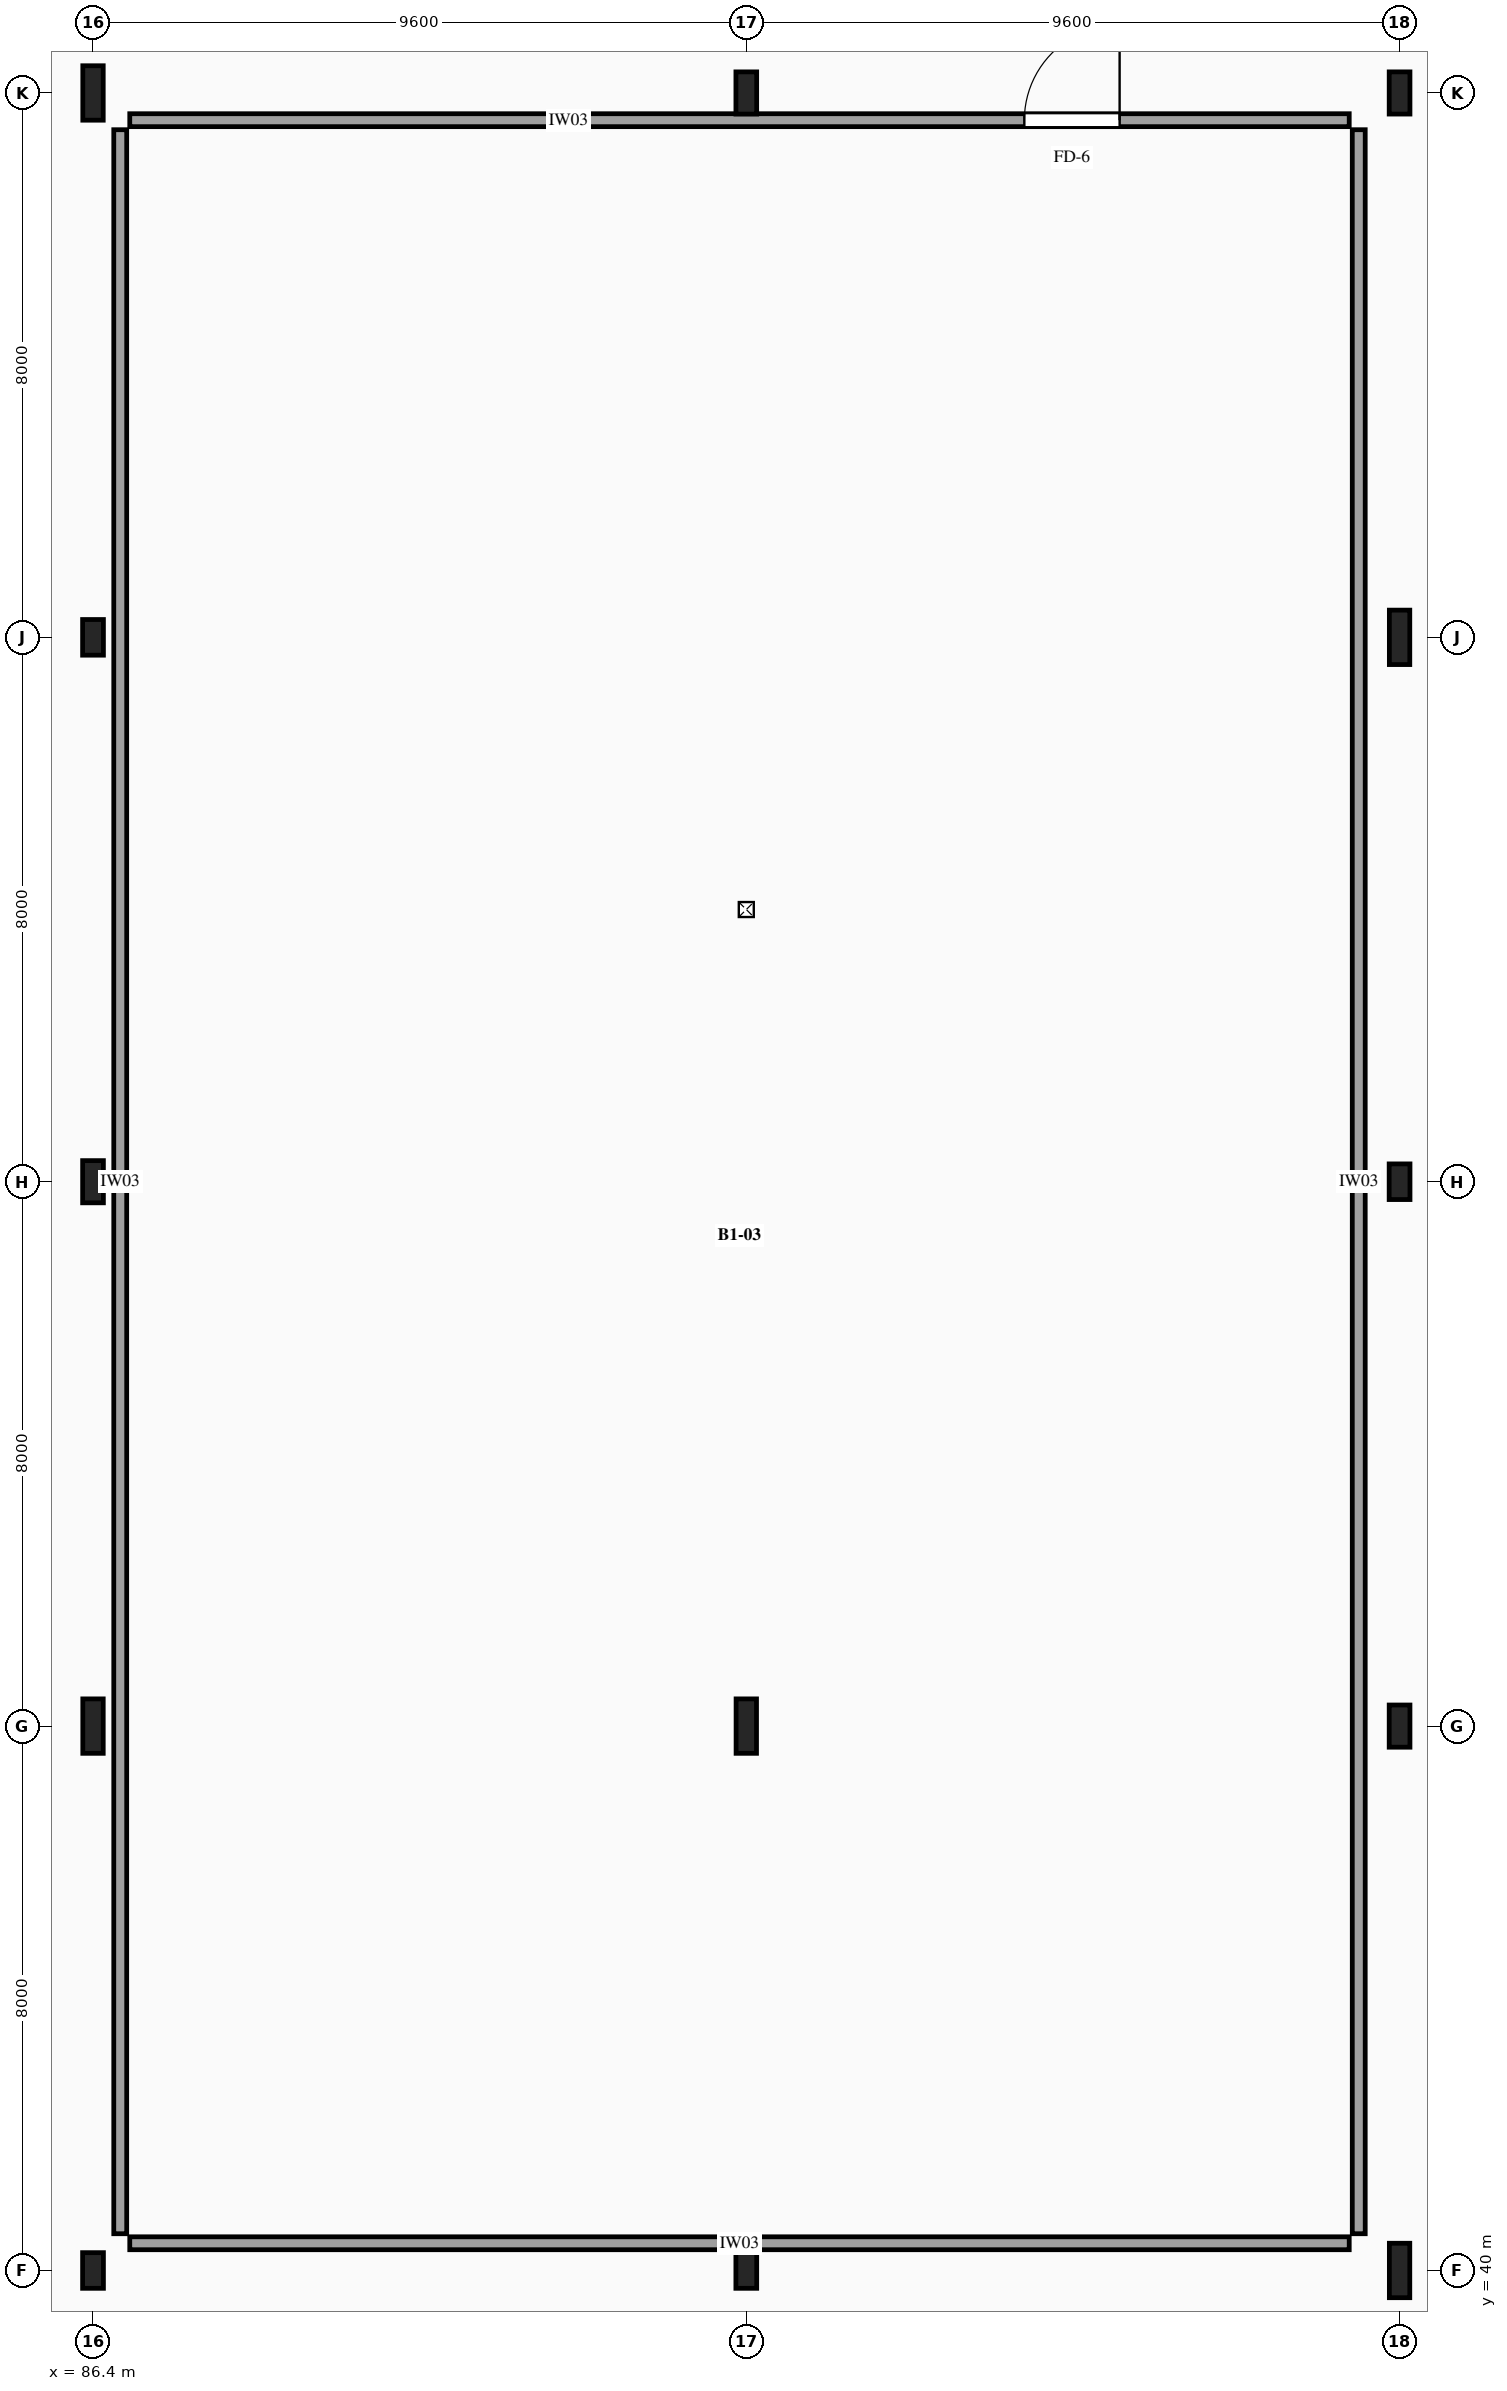
"""IFC4 building model, lengths in metres.
Left out: names, types, materials, properties, quantities, classifications, styles, units other than length and angle.
Written with IfcOpenShell. Run it as: python <this file> out.ifc"""

import sys

from ifc_helpers import new_model, si_unit, direction, frame, frame_2d, origin, origin_2d, place, context, subcontext, project, spatial, rectangle, i_section, extrude, element, fill, save


model = new_model("IFC4")
c1 = context("Model", 3, precision=1e-05, world=origin(), true_north=direction((0.0, 1.0)))
c2 = subcontext(c1, "Body", "Model", "MODEL_VIEW")
j1 = project(units=[si_unit("LENGTHUNIT", "METRE"), si_unit("PLANEANGLEUNIT", "RADIAN")], contexts=[c1])
p1 = place(None, origin())
s1 = spatial("IfcSite", under=j1, at=p1, CompositionType="ELEMENT")
p2 = place(p1, origin())
s2 = spatial("IfcBuilding", under=s1, at=p2, CompositionType="ELEMENT")
p3 = place(p2, frame((0.0, 0.0, -4.5)))
s3 = spatial("IfcBuildingStorey", under=s2, at=p3, CompositionType="ELEMENT", Elevation=-4.5)
p4 = place(p3, frame((86.4, 40.0, 0.0), z_axis=(0.0, 0.0, 1.0), x_axis=(1.0, 0.0, 0.0)))
e1 = element("IfcColumn", 1, at=p4, inside=s3, PredefinedType="COLUMN", context=c2, shape_type="SweptSolid", body=[
    extrude(i_section(OverallWidth=0.306, OverallDepth=0.524, WebThickness=0.021, FlangeThickness=0.04, FilletRadius=0.027, at=origin_2d()), origin(), (0.0, 0.0, 1.0), 4.22),
])
p5 = place(p3, frame((86.4, 48.0, 0.0), z_axis=(0.0, 0.0, 1.0), x_axis=(1.0, 0.0, 0.0)))
e2 = element("IfcColumn", 2, at=p5, inside=s3, PredefinedType="COLUMN", context=c2, shape_type="SweptSolid", body=[
    extrude(i_section(OverallWidth=0.3, OverallDepth=0.8, WebThickness=0.018, FlangeThickness=0.033, FilletRadius=0.03, at=origin_2d()), origin(), (0.0, 0.0, 1.0), 4.22),
])
p6 = place(p3, frame((86.4, 56.0, 0.0), z_axis=(0.0, 0.0, 1.0), x_axis=(1.0, 0.0, 0.0)))
e3 = element("IfcColumn", 3, at=p6, inside=s3, PredefinedType="COLUMN", context=c2, shape_type="SweptSolid", body=[
    extrude(i_section(OverallWidth=0.305, OverallDepth=0.62, WebThickness=0.021, FlangeThickness=0.04, FilletRadius=0.027, at=origin_2d()), origin(), (0.0, 0.0, 1.0), 4.22),
])
p7 = place(p3, frame((86.4, 64.0, 0.0), z_axis=(0.0, 0.0, 1.0), x_axis=(1.0, 0.0, 0.0)))
e4 = element("IfcColumn", 4, at=p7, inside=s3, PredefinedType="COLUMN", context=c2, shape_type="SweptSolid", body=[
    extrude(i_section(OverallWidth=0.306, OverallDepth=0.524, WebThickness=0.021, FlangeThickness=0.04, FilletRadius=0.027, at=origin_2d()), origin(), (0.0, 0.0, 1.0), 4.22),
])
p8 = place(p3, frame((86.4, 72.0, 0.0), z_axis=(0.0, 0.0, 1.0), x_axis=(1.0, 0.0, 0.0)))
e5 = element("IfcColumn", 5, at=p8, inside=s3, PredefinedType="COLUMN", context=c2, shape_type="SweptSolid", body=[
    extrude(i_section(OverallWidth=0.3, OverallDepth=0.8, WebThickness=0.018, FlangeThickness=0.033, FilletRadius=0.03, at=origin_2d()), origin(), (0.0, 0.0, 1.0), 4.22),
])
p9 = place(p3, frame((96.0, 40.0, 0.0), z_axis=(0.0, 0.0, 1.0), x_axis=(1.0, 0.0, 0.0)))
e6 = element("IfcColumn", 6, at=p9, inside=s3, PredefinedType="COLUMN", context=c2, shape_type="SweptSolid", body=[
    extrude(i_section(OverallWidth=0.306, OverallDepth=0.524, WebThickness=0.021, FlangeThickness=0.04, FilletRadius=0.027, at=origin_2d()), origin(), (0.0, 0.0, 1.0), 4.22),
])
p10 = place(p3, frame((96.0, 48.0, 0.0), z_axis=(0.0, 0.0, 1.0), x_axis=(1.0, 0.0, 0.0)))
e7 = element("IfcColumn", 7, at=p10, inside=s3, PredefinedType="COLUMN", context=c2, shape_type="SweptSolid", body=[
    extrude(i_section(OverallWidth=0.3, OverallDepth=0.8, WebThickness=0.018, FlangeThickness=0.033, FilletRadius=0.03, at=origin_2d()), origin(), (0.0, 0.0, 1.0), 4.22),
])
p11 = place(p3, frame((96.0, 72.0, 0.0), z_axis=(0.0, 0.0, 1.0), x_axis=(1.0, 0.0, 0.0)))
e8 = element("IfcColumn", 8, at=p11, inside=s3, PredefinedType="COLUMN", context=c2, shape_type="SweptSolid", body=[
    extrude(i_section(OverallWidth=0.305, OverallDepth=0.62, WebThickness=0.021, FlangeThickness=0.04, FilletRadius=0.027, at=origin_2d()), origin(), (0.0, 0.0, 1.0), 4.22),
])
p12 = place(p3, frame((105.6, 40.0, 0.0), z_axis=(0.0, 0.0, 1.0), x_axis=(1.0, 0.0, 0.0)))
e9 = element("IfcColumn", 9, at=p12, inside=s3, PredefinedType="COLUMN", context=c2, shape_type="SweptSolid", body=[
    extrude(i_section(OverallWidth=0.3, OverallDepth=0.8, WebThickness=0.018, FlangeThickness=0.033, FilletRadius=0.03, at=origin_2d()), origin(), (0.0, 0.0, 1.0), 4.22),
])
p13 = place(p3, frame((105.6, 48.0, 0.0), z_axis=(0.0, 0.0, 1.0), x_axis=(1.0, 0.0, 0.0)))
e10 = element("IfcColumn", 10, at=p13, inside=s3, PredefinedType="COLUMN", context=c2, shape_type="SweptSolid", body=[
    extrude(i_section(OverallWidth=0.305, OverallDepth=0.62, WebThickness=0.021, FlangeThickness=0.04, FilletRadius=0.027, at=origin_2d()), origin(), (0.0, 0.0, 1.0), 4.22),
])
p14 = place(p3, frame((105.6, 56.0, 0.0), z_axis=(0.0, 0.0, 1.0), x_axis=(1.0, 0.0, 0.0)))
e11 = element("IfcColumn", 11, at=p14, inside=s3, PredefinedType="COLUMN", context=c2, shape_type="SweptSolid", body=[
    extrude(i_section(OverallWidth=0.306, OverallDepth=0.524, WebThickness=0.021, FlangeThickness=0.04, FilletRadius=0.027, at=origin_2d()), origin(), (0.0, 0.0, 1.0), 4.22),
])
p15 = place(p3, frame((105.6, 64.0, 0.0), z_axis=(0.0, 0.0, 1.0), x_axis=(1.0, 0.0, 0.0)))
e12 = element("IfcColumn", 12, at=p15, inside=s3, PredefinedType="COLUMN", context=c2, shape_type="SweptSolid", body=[
    extrude(i_section(OverallWidth=0.3, OverallDepth=0.8, WebThickness=0.018, FlangeThickness=0.033, FilletRadius=0.03, at=origin_2d()), origin(), (0.0, 0.0, 1.0), 4.22),
])
p16 = place(p3, frame((105.6, 72.0, 0.0), z_axis=(0.0, 0.0, 1.0), x_axis=(1.0, 0.0, 0.0)))
e13 = element("IfcColumn", 13, at=p16, inside=s3, PredefinedType="COLUMN", context=c2, shape_type="SweptSolid", body=[
    extrude(i_section(OverallWidth=0.305, OverallDepth=0.62, WebThickness=0.021, FlangeThickness=0.04, FilletRadius=0.027, at=origin_2d()), origin(), (0.0, 0.0, 1.0), 4.22),
])
p17 = place(p3, frame((86.94, 71.6, 0.0), z_axis=(0.0, 0.0, 1.0), x_axis=(1.0, 0.0, 0.0)))
e14 = element("IfcWall", 14, at=p17, inside=s3, PredefinedType="SOLIDWALL", context=c2, shape_type="SweptSolid", body=[
    extrude(rectangle(XDim=17.92, YDim=0.19, at=frame_2d((8.96, 0.0))), origin(), (0.0, 0.0, 1.0), 3.58),
])
p18 = place(p17, frame((13.146, 0.0, 0.0)))
e15 = element("IfcOpeningElement", 15, at=p18, cuts=e14, PredefinedType="OPENING", context=c2, shape_type="SweptSolid", body=[
    extrude(rectangle(XDim=1.4, YDim=2.15, at=frame_2d((0.7, 1.075))), frame((0.0, 0.105, 0.0), z_axis=(0.0, -1.0, 0.0), x_axis=(1.0, 0.0, 0.0)), (0.0, 0.0, 1.0), 0.21),
])
p19 = place(p3, frame((86.94, 40.4, 0.0), z_axis=(0.0, 0.0, 1.0), x_axis=(1.0, 0.0, 0.0)))
e16 = element("IfcWall", 16, at=p19, inside=s3, PredefinedType="SOLIDWALL", context=c2, shape_type="SweptSolid", body=[
    extrude(rectangle(XDim=17.92, YDim=0.19, at=frame_2d((8.96, 0.0))), origin(), (0.0, 0.0, 1.0), 3.58),
])
for number, where, z_axis, x_axis in (
    (17, (86.8, 40.54, 0.0), (0.0, 0.0, 1.0), (0.0, 1.0, 0.0)),
    (18, (105.0, 40.54, 0.0), (0.0, 0.0, 1.0), (0.0, 1.0, 0.0)),
):
    element("IfcWall", number, at=place(p3, frame(where, z_axis=z_axis, x_axis=x_axis)), inside=s3, PredefinedType="SOLIDWALL", context=c2, shape_type="SweptSolid", body=[
        extrude(rectangle(XDim=30.92, YDim=0.19, at=frame_2d((15.46, 0.0))), origin(), (0.0, 0.0, 1.0), 3.58),
    ])
p20 = place(p18, origin())
e19 = element("IfcDoor", 19, at=p20, inside=s3, OperationType="SINGLE_SWING_RIGHT", PredefinedType="DOOR", context=c2, shape_type="SweptSolid", body=[
    extrude(rectangle(XDim=1.4, YDim=2.15, at=frame_2d((0.7, 1.075))), frame((0.0, 0.025, 0.0), z_axis=(0.0, -1.0, 0.0), x_axis=(1.0, 0.0, 0.0)), (0.0, 0.0, 1.0), 0.05),
])
fill(e15, e19)
save(model, sys.argv[1])
